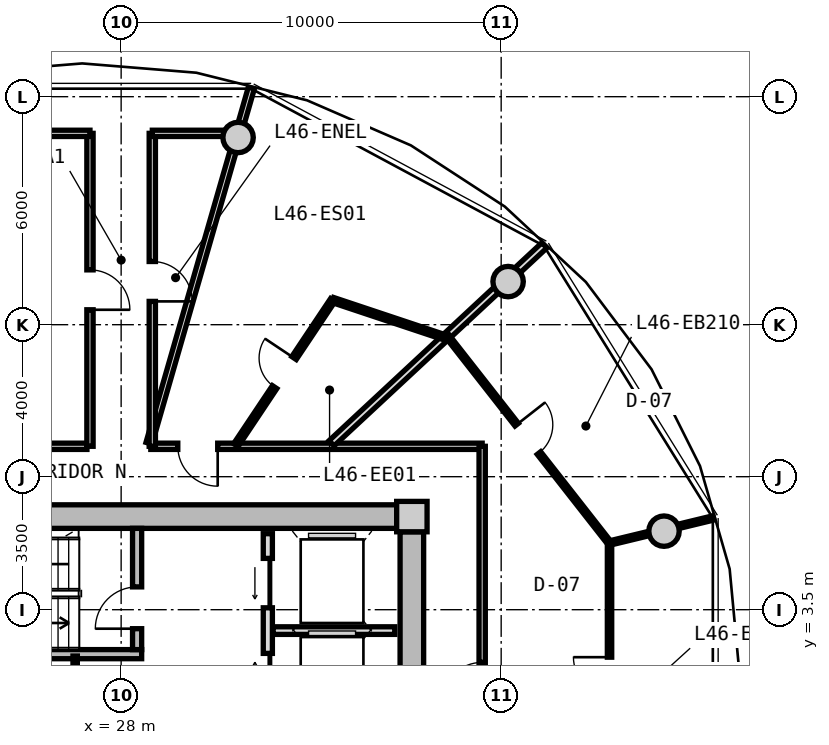
"""IFC4 building model, lengths in metres.
Left out: names, types, materials, properties, quantities, classifications, styles, units other than length and angle.
Written with IfcOpenShell. Run it as: python <this file> out.ifc"""

import sys

from ifc_helpers import new_model, si_unit, direction, frame, frame_2d, origin, origin_2d, place, context, subcontext, project, spatial, rectangle, circle, extrude, source, transform, mapped, element, fill, save


model = new_model("IFC4")
c1 = context("Model", 3, precision=1e-05, world=origin(), true_north=direction((0.0, 1.0)))
c2 = subcontext(c1, "Body", "Model", "MODEL_VIEW")
j1 = project(units=[si_unit("LENGTHUNIT", "METRE"), si_unit("PLANEANGLEUNIT", "RADIAN")], contexts=[c1])
p1 = place(None, origin())
s1 = spatial("IfcSite", under=j1, at=p1, CompositionType="ELEMENT")
p2 = place(p1, origin())
s2 = spatial("IfcBuilding", under=s1, at=p2, CompositionType="ELEMENT")
p3 = place(p2, frame((0.0, 0.0, 149.55)))
s3 = spatial("IfcBuildingStorey", under=s2, at=p3, CompositionType="ELEMENT", Elevation=149.55)
m1 = source(origin(), c2, "Body", "SweptSolid", [
    extrude(rectangle(XDim=0.8, YDim=0.8, at=origin_2d()), origin(), (0.0, 0.0, 1.0), 3.05),
])
p4 = place(p3, frame((35.65, 5.95, 0.0), z_axis=(0.0, 0.0, 1.0), x_axis=(1.0, 0.0, 0.0)))
e1 = element("IfcColumn", 1, at=p4, inside=s3, PredefinedType="COLUMN", context=c2, shape_type="MappedRepresentation", body=[
    mapped(m1, transform((0.0, 0.0, 0.0), x_axis=(1.0, 0.0, 0.0), y_axis=(0.0, 1.0, 0.0), z_axis=(0.0, 0.0, 1.0), scale=1.0)),
])
m2 = source(origin(), c2, "Body", "SweptSolid", [
    extrude(rectangle(XDim=14.5, YDim=0.62, at=frame_2d((7.25, 0.0))), origin(), (0.0, 0.0, 1.0), 2.81),
])
p5 = place(p3, frame((20.75, 5.95, 0.0), z_axis=(0.0, 0.0, 1.0), x_axis=(1.0, 0.0, 0.0)))
e2 = element("IfcWall", 2, at=p5, inside=s3, PredefinedType="SHEAR", context=c2, shape_type="MappedRepresentation", body=[
    mapped(m2, transform((0.0, 0.0, 0.0), x_axis=(1.0, 0.0, 0.0), y_axis=(0.0, 1.0, 0.0), z_axis=(0.0, 0.0, 1.0), scale=1.0)),
])
m3 = source(origin(), c2, "Body", "SweptSolid", [
    extrude(rectangle(XDim=11.1, YDim=0.62, at=frame_2d((5.55, 0.0))), origin(), (0.0, 0.0, 1.0), 2.81),
])
p6 = place(p3, frame((35.65, 5.55, 0.0), z_axis=(0.0, 0.0, 1.0), x_axis=(0.0, -1.0, 0.0)))
e3 = element("IfcWall", 3, at=p6, inside=s3, PredefinedType="SHEAR", context=c2, shape_type="MappedRepresentation", body=[
    mapped(m3, transform((0.0, 0.0, 0.0), x_axis=(1.0, 0.0, 0.0), y_axis=(0.0, 1.0, 0.0), z_axis=(0.0, 0.0, 1.0), scale=1.0)),
])
p7 = place(p6, frame((5.65, 0.0, 0.0)))
e4 = element("IfcOpeningElement", 4, at=p7, cuts=e3, PredefinedType="OPENING", context=c2, shape_type="SweptSolid", body=[
    extrude(rectangle(XDim=1.2, YDim=2.15, at=frame_2d((0.6, 1.075))), frame((0.0, 0.32, 0.0), z_axis=(0.0, -1.0, 0.0), x_axis=(1.0, 0.0, 0.0)), (0.0, 0.0, 1.0), 0.64),
])
p8 = place(p6, frame((9.3, 0.0, 0.0)))
e5 = element("IfcOpeningElement", 5, at=p8, cuts=e3, PredefinedType="OPENING", context=c2, shape_type="SweptSolid", body=[
    extrude(rectangle(XDim=1.0, YDim=2.1, at=frame_2d((0.5, 1.05))), frame((0.0, 0.32, 0.0), z_axis=(0.0, -1.0, 0.0), x_axis=(1.0, 0.0, 0.0)), (0.0, 0.0, 1.0), 0.64),
])
m4 = source(origin(), c2, "Body", "SweptSolid", [
    extrude(circle(Radius=0.4, at=origin_2d()), origin(), (0.0, 0.0, 1.0), 3.05),
])
for number, where, z_axis, x_axis in (
    (6, (42.285, 5.567, 0.0), (0.0, 0.0, 1.0), (1.0, 0.0, 0.0)),
    (7, (38.183, 12.135, 0.0), (0.0, 0.0, 1.0), (1.0, 0.0, 0.0)),
    (8, (31.077, 15.926, 0.0), (0.0, 0.0, 1.0), (1.0, 0.0, 0.0)),
):
    element("IfcColumn", number, at=place(p3, frame(where, z_axis=z_axis, x_axis=x_axis)), inside=s3, PredefinedType="COLUMN", context=c2, shape_type="MappedRepresentation", body=[
        mapped(m4, transform((0.0, 0.0, 0.0), x_axis=(1.0, 0.0, 0.0), y_axis=(0.0, 1.0, 0.0), z_axis=(0.0, 0.0, 1.0), scale=1.0)),
    ])
m5 = source(origin(), c2, "Body", "SweptSolid", [
    extrude(rectangle(XDim=7.88, YDim=0.24, at=frame_2d((3.94, 0.0))), origin(), (0.0, 0.0, 1.0), 2.81),
])
p9 = place(p3, frame((20.66, 2.33, 0.0), z_axis=(0.0, 0.0, 1.0), x_axis=(1.0, 0.0, 0.0)))
e9 = element("IfcWall", 9, at=p9, inside=s3, PredefinedType="PARTITIONING", context=c2, shape_type="MappedRepresentation", body=[
    mapped(m5, transform((0.0, 0.0, 0.0), x_axis=(1.0, 0.0, 0.0), y_axis=(0.0, 1.0, 0.0), z_axis=(0.0, 0.0, 1.0), scale=1.0)),
])
m6 = source(origin(), c2, "Body", "SweptSolid", [
    extrude(rectangle(XDim=3.19, YDim=0.24, at=frame_2d((1.595, 0.0))), origin(), (0.0, 0.0, 1.0), 2.81),
])
p10 = place(p3, frame((28.42, 2.45, 0.0), z_axis=(0.0, 0.0, 1.0), x_axis=(0.0, 1.0, 0.0)))
e10 = element("IfcWall", 10, at=p10, inside=s3, PredefinedType="PARTITIONING", context=c2, shape_type="MappedRepresentation", body=[
    mapped(m6, transform((0.0, 0.0, 0.0), x_axis=(1.0, 0.0, 0.0), y_axis=(0.0, 1.0, 0.0), z_axis=(0.0, 0.0, 1.0), scale=1.0)),
])
p11 = place(p10, frame((0.55, 0.0, 0.0)))
e11 = element("IfcOpeningElement", 11, at=p11, cuts=e10, PredefinedType="OPENING", context=c2, shape_type="SweptSolid", body=[
    extrude(rectangle(XDim=1.1, YDim=2.15, at=frame_2d((0.55, 1.075))), frame((0.0, 0.13, 0.0), z_axis=(0.0, -1.0, 0.0), x_axis=(1.0, 0.0, 0.0)), (0.0, 0.0, 1.0), 0.26),
])
m7 = source(origin(), c2, "Body", "SweptSolid", [
    extrude(rectangle(XDim=5.0, YDim=0.24, at=frame_2d((2.5, 0.0))), origin(), (0.0, 0.0, 1.0), 2.795),
])
p12 = place(p3, frame((31.86, 0.5, 0.0), z_axis=(0.0, 0.0, 1.0), x_axis=(0.0, 1.0, 0.0)))
e12 = element("IfcWall", 12, at=p12, inside=s3, PredefinedType="PARTITIONING", context=c2, shape_type="MappedRepresentation", body=[
    mapped(m7, transform((0.0, 0.0, 0.0), x_axis=(1.0, 0.0, 0.0), y_axis=(0.0, 1.0, 0.0), z_axis=(0.0, 0.0, 1.0), scale=1.0)),
])
p13 = place(p12, frame((3.05, 0.0, 0.0)))
e13 = element("IfcOpeningElement", 13, at=p13, cuts=e12, PredefinedType="OPENING", context=c2, shape_type="SweptSolid", body=[
    extrude(rectangle(XDim=1.3, YDim=2.2, at=frame_2d((0.65, 1.1))), frame((0.0, 0.13, 0.0), z_axis=(0.0, -1.0, 0.0), x_axis=(1.0, 0.0, 0.0)), (0.0, 0.0, 1.0), 0.26),
])
p14 = place(p12, frame((0.55, 0.0, 0.0)))
e14 = element("IfcOpeningElement", 14, at=p14, cuts=e12, PredefinedType="OPENING", context=c2, shape_type="SweptSolid", body=[
    extrude(rectangle(XDim=1.3, YDim=2.2, at=frame_2d((0.65, 1.1))), frame((0.0, 0.13, 0.0), z_axis=(0.0, -1.0, 0.0), x_axis=(1.0, 0.0, 0.0)), (0.0, 0.0, 1.0), 0.26),
])
m8 = source(origin(), c2, "Body", "SweptSolid", [
    extrude(rectangle(XDim=3.2, YDim=0.2, at=frame_2d((1.6, 0.0))), origin(), (0.0, 0.0, 1.0), 2.795),
])
p15 = place(p3, frame((32.0, 2.95, 0.0), z_axis=(0.0, 0.0, 1.0), x_axis=(1.0, 0.0, 0.0)))
e15 = element("IfcWall", 15, at=p15, inside=s3, PredefinedType="PARTITIONING", context=c2, shape_type="MappedRepresentation", body=[
    mapped(m8, transform((0.0, 0.0, 0.0), x_axis=(1.0, 0.0, 0.0), y_axis=(0.0, 1.0, 0.0), z_axis=(0.0, 0.0, 1.0), scale=1.0)),
])
m9 = source(origin(), c2, "Body", "SweptSolid", [
    extrude(rectangle(XDim=2.33, YDim=0.115, at=frame_2d((1.165, 0.0))), origin(), (0.0, 0.0, 1.0), 2.795),
])
p16 = place(p3, frame((26.79, -0.05, 0.0), z_axis=(0.0, 0.0, 1.0), x_axis=(0.0, 1.0, 0.0)))
e16 = element("IfcWall", 16, at=p16, inside=s3, PredefinedType="PARTITIONING", context=c2, shape_type="MappedRepresentation", body=[
    mapped(m9, transform((0.0, 0.0, 0.0), x_axis=(1.0, 0.0, 0.0), y_axis=(0.0, 1.0, 0.0), z_axis=(0.0, 0.0, 1.0), scale=1.0)),
])
m10 = source(origin(), c2, "Body", "SweptSolid", [
    extrude(rectangle(XDim=8.6, YDim=0.165, at=frame_2d((4.3, 0.0))), origin(), (0.0, 0.0, 1.0), 2.795),
])
p17 = place(p3, frame((18.5, 7.8, 0.0), z_axis=(0.0, 0.0, 1.0), x_axis=(1.0, 0.0, 0.0)))
e17 = element("IfcWall", 17, at=p17, inside=s3, PredefinedType="PARTITIONING", context=c2, shape_type="MappedRepresentation", body=[
    mapped(m10, transform((0.0, 0.0, 0.0), x_axis=(1.0, 0.0, 0.0), y_axis=(0.0, 1.0, 0.0), z_axis=(0.0, 0.0, 1.0), scale=1.0)),
])
m11 = source(origin(), c2, "Body", "SweptSolid", [
    extrude(rectangle(XDim=8.719, YDim=0.165, at=frame_2d((4.36, 0.0))), origin(), (0.0, 0.0, 1.0), 2.795),
])
p18 = place(p3, frame((28.781, 7.8, 0.0), z_axis=(0.0, 0.0, 1.0), x_axis=(1.0, 0.0, 0.0)))
e18 = element("IfcWall", 18, at=p18, inside=s3, PredefinedType="PARTITIONING", context=c2, shape_type="MappedRepresentation", body=[
    mapped(m11, transform((0.0, 0.0, 0.0), x_axis=(1.0, 0.0, 0.0), y_axis=(0.0, 1.0, 0.0), z_axis=(0.0, 0.0, 1.0), scale=1.0)),
])
p19 = place(p18, frame((0.71, 0.0, 0.0)))
e19 = element("IfcOpeningElement", 19, at=p19, cuts=e18, PredefinedType="OPENING", context=c2, shape_type="SweptSolid", body=[
    extrude(rectangle(XDim=1.05, YDim=2.15, at=frame_2d((0.525, 1.075))), frame((0.0, 0.093, 0.0), z_axis=(0.0, -1.0, 0.0), x_axis=(1.0, 0.0, 0.0)), (0.0, 0.0, 1.0), 0.185),
])
m12 = source(origin(), c2, "Body", "SweptSolid", [
    extrude(rectangle(XDim=15.6, YDim=0.165, at=frame_2d((7.8, 0.0))), origin(), (0.0, 0.0, 1.0), 2.795),
])
p20 = place(p3, frame((37.5, 7.8, 0.0), z_axis=(0.0, 0.0, 1.0), x_axis=(0.0, -1.0, 0.0)))
e20 = element("IfcWall", 20, at=p20, inside=s3, PredefinedType="PARTITIONING", context=c2, shape_type="MappedRepresentation", body=[
    mapped(m12, transform((0.0, 0.0, 0.0), x_axis=(1.0, 0.0, 0.0), y_axis=(0.0, 1.0, 0.0), z_axis=(0.0, 0.0, 1.0), scale=1.0)),
])
p21 = place(p20, frame((5.687, 0.0, 0.0)))
e21 = element("IfcOpeningElement", 21, at=p21, cuts=e20, PredefinedType="OPENING", context=c2, shape_type="SweptSolid", body=[
    extrude(rectangle(XDim=1.05, YDim=2.15, at=frame_2d((0.525, 1.075))), frame((0.0, 0.093, 0.0), z_axis=(0.0, -1.0, 0.0), x_axis=(1.0, 0.0, 0.0)), (0.0, 0.0, 1.0), 0.185),
])
m13 = source(origin(), c2, "Body", "SweptSolid", [
    extrude(rectangle(XDim=9.73, YDim=0.165, at=frame_2d((4.865, 0.0))), origin(), (0.0, 0.0, 1.0), 2.345),
])
p22 = place(p3, frame((28.733, 7.88, 0.0), z_axis=(0.0, 0.0, 1.0), x_axis=(0.27679492614, 0.960929013436, 0.0)))
e22 = element("IfcWall", 22, at=p22, inside=s3, PredefinedType="PARTITIONING", context=c2, shape_type="MappedRepresentation", body=[
    mapped(m13, transform((0.0, 0.0, 0.0), x_axis=(1.0, 0.0, 0.0), y_axis=(0.0, 1.0, 0.0), z_axis=(0.0, 0.0, 1.0), scale=1.0)),
])
m14 = source(origin(), c2, "Body", "SweptSolid", [
    extrude(rectangle(XDim=8.235, YDim=0.165, at=frame_2d((4.118, 0.0))), origin(), (0.0, 0.0, 1.0), 2.795),
])
p23 = place(p3, frame((27.18, 7.8, 0.0), z_axis=(0.0, 0.0, 1.0), x_axis=(0.0, 1.0, 0.0)))
e23 = element("IfcWall", 23, at=p23, inside=s3, PredefinedType="PARTITIONING", context=c2, shape_type="MappedRepresentation", body=[
    mapped(m14, transform((0.0, 0.0, 0.0), x_axis=(1.0, 0.0, 0.0), y_axis=(0.0, 1.0, 0.0), z_axis=(0.0, 0.0, 1.0), scale=1.0)),
])
p24 = place(p23, frame((3.593, 0.0, 0.0)))
e24 = element("IfcOpeningElement", 24, at=p24, cuts=e23, PredefinedType="OPENING", context=c2, shape_type="SweptSolid", body=[
    extrude(rectangle(XDim=1.05, YDim=2.15, at=frame_2d((0.525, 1.075))), frame((0.0, 0.093, 0.0), z_axis=(0.0, -1.0, 0.0), x_axis=(1.0, 0.0, 0.0)), (0.0, 0.0, 1.0), 0.185),
])
m15 = source(origin(), c2, "Body", "SweptSolid", [
    extrude(rectangle(XDim=7.139, YDim=0.165, at=frame_2d((3.569, 0.0))), origin(), (0.0, 0.0, 1.0), 2.345),
])
p25 = place(p3, frame((20.041, 16.035, 0.0), z_axis=(0.0, 0.0, 1.0), x_axis=(1.0, 0.0, 0.0)))
e25 = element("IfcWall", 25, at=p25, inside=s3, PredefinedType="PARTITIONING", context=c2, shape_type="MappedRepresentation", body=[
    mapped(m15, transform((0.0, 0.0, 0.0), x_axis=(1.0, 0.0, 0.0), y_axis=(0.0, 1.0, 0.0), z_axis=(0.0, 0.0, 1.0), scale=1.0)),
])
p26 = place(p3, frame((28.82, 7.8, 0.0), z_axis=(0.0, 0.0, 1.0), x_axis=(0.0, 1.0, 0.0)))
e26 = element("IfcWall", 26, at=p26, inside=s3, PredefinedType="PARTITIONING", context=c2, shape_type="MappedRepresentation", body=[
    mapped(m14, transform((0.0, 0.0, 0.0), x_axis=(1.0, 0.0, 0.0), y_axis=(0.0, 1.0, 0.0), z_axis=(0.0, 0.0, 1.0), scale=1.0)),
])
p27 = place(p26, frame((3.813, 0.0, 0.0)))
e27 = element("IfcOpeningElement", 27, at=p27, cuts=e26, PredefinedType="OPENING", context=c2, shape_type="SweptSolid", body=[
    extrude(rectangle(XDim=1.05, YDim=2.15, at=frame_2d((0.525, 1.075))), frame((0.0, 0.093, 0.0), z_axis=(0.0, -1.0, 0.0), x_axis=(1.0, 0.0, 0.0)), (0.0, 0.0, 1.0), 0.185),
])
m16 = source(origin(), c2, "Body", "SweptSolid", [
    extrude(rectangle(XDim=2.419, YDim=0.165, at=frame_2d((1.209, 0.0))), origin(), (0.0, 0.0, 1.0), 2.345),
])
p28 = place(p3, frame((28.82, 16.035, 0.0), z_axis=(0.0, 0.0, 1.0), x_axis=(1.0, 0.0, 0.0)))
e28 = element("IfcWall", 28, at=p28, inside=s3, PredefinedType="PARTITIONING", context=c2, shape_type="MappedRepresentation", body=[
    mapped(m16, transform((0.0, 0.0, 0.0), x_axis=(1.0, 0.0, 0.0), y_axis=(0.0, 1.0, 0.0), z_axis=(0.0, 0.0, 1.0), scale=1.0)),
])
m17 = source(origin(), c2, "Body", "SweptSolid", [
    extrude(rectangle(XDim=7.648, YDim=0.19, at=frame_2d((3.824, 0.0))), origin(), (0.0, 0.0, 1.0), 2.345),
])
p29 = place(p3, frame((33.538, 7.88, 0.0), z_axis=(0.0, 0.0, 1.0), x_axis=(0.732167856666, 0.681124239522, 0.0)))
e29 = element("IfcWall", 29, at=p29, inside=s3, PredefinedType="PARTITIONING", context=c2, shape_type="MappedRepresentation", body=[
    mapped(m17, transform((0.0, 0.0, 0.0), x_axis=(1.0, 0.0, 0.0), y_axis=(0.0, 1.0, 0.0), z_axis=(0.0, 0.0, 1.0), scale=1.0)),
])
m18 = source(origin(), c2, "Body", "SweptSolid", [
    extrude(rectangle(XDim=6.958, YDim=0.115, at=frame_2d((3.479, 0.0))), origin(), (0.0, 0.0, 1.0), 2.795),
])
p30 = place(p3, frame((40.851, -1.703, 0.0), z_axis=(0.0, 0.0, 1.0), x_axis=(0.0, 1.0, 0.0)))
e30 = element("IfcWall", 30, at=p30, inside=s3, PredefinedType="PARTITIONING", context=c2, shape_type="MappedRepresentation", body=[
    mapped(m18, transform((0.0, 0.0, 0.0), x_axis=(1.0, 0.0, 0.0), y_axis=(0.0, 1.0, 0.0), z_axis=(0.0, 0.0, 1.0), scale=1.0)),
])
p31 = place(p30, frame((3.004, 0.0, 0.0)))
e31 = element("IfcOpeningElement", 31, at=p31, cuts=e30, PredefinedType="OPENING", context=c2, shape_type="SweptSolid", body=[
    extrude(rectangle(XDim=0.95, YDim=2.1, at=frame_2d((0.475, 1.05))), frame((0.0, 0.067, 0.0), z_axis=(0.0, -1.0, 0.0), x_axis=(1.0, 0.0, 0.0)), (0.0, 0.0, 1.0), 0.135),
])
m19 = source(origin(), c2, "Body", "SweptSolid", [
    extrude(rectangle(XDim=6.966, YDim=0.115, at=frame_2d((3.483, 0.0))), origin(), (0.0, 0.0, 1.0), 2.795),
])
p32 = place(p3, frame((40.85, 5.254, 0.0), z_axis=(0.0, 0.0, 1.0), x_axis=(-0.616695640563, 0.787201681217, 0.0)))
e32 = element("IfcWall", 32, at=p32, inside=s3, PredefinedType="PARTITIONING", context=c2, shape_type="MappedRepresentation", body=[
    mapped(m19, transform((0.0, 0.0, 0.0), x_axis=(1.0, 0.0, 0.0), y_axis=(0.0, 1.0, 0.0), z_axis=(0.0, 0.0, 1.0), scale=1.0)),
])
p33 = place(p32, frame((3.008, 0.0, 0.0)))
e33 = element("IfcOpeningElement", 33, at=p33, cuts=e32, PredefinedType="OPENING", context=c2, shape_type="SweptSolid", body=[
    extrude(rectangle(XDim=0.95, YDim=2.1, at=frame_2d((0.475, 1.05))), frame((0.0, 0.067, 0.0), z_axis=(0.0, -1.0, 0.0), x_axis=(1.0, 0.0, 0.0)), (0.0, 0.0, 1.0), 0.135),
])
m20 = source(origin(), c2, "Body", "SweptSolid", [
    extrude(rectangle(XDim=2.818, YDim=0.115, at=frame_2d((1.409, 0.0))), origin(), (0.0, 0.0, 1.0), 2.345),
])
p34 = place(p3, frame((40.85, 5.254, 0.0), z_axis=(0.0, 0.0, 1.0), x_axis=(0.971949193017, 0.235190914353, 0.0)))
e34 = element("IfcWall", 34, at=p34, inside=s3, PredefinedType="PARTITIONING", context=c2, shape_type="MappedRepresentation", body=[
    mapped(m20, transform((0.0, 0.0, 0.0), x_axis=(1.0, 0.0, 0.0), y_axis=(0.0, 1.0, 0.0), z_axis=(0.0, 0.0, 1.0), scale=1.0)),
])
m21 = source(origin(), c2, "Body", "SweptSolid", [
    extrude(rectangle(XDim=4.593, YDim=0.14, at=frame_2d((2.296, 0.0))), origin(), (0.0, 0.0, 1.0), 2.795),
])
p35 = place(p3, frame((31.019, 7.83, 0.0), z_axis=(0.0, 0.0, 1.0), x_axis=(0.555362412301, 0.831608436107, 0.0)))
e35 = element("IfcWall", 35, at=p35, inside=s3, PredefinedType="PARTITIONING", context=c2, shape_type="MappedRepresentation", body=[
    mapped(m21, transform((0.0, 0.0, 0.0), x_axis=(1.0, 0.0, 0.0), y_axis=(0.0, 1.0, 0.0), z_axis=(0.0, 0.0, 1.0), scale=1.0)),
])
p36 = place(p35, frame((1.836, 0.0, 0.0)))
e36 = element("IfcOpeningElement", 36, at=p36, cuts=e35, PredefinedType="OPENING", context=c2, shape_type="SweptSolid", body=[
    extrude(rectangle(XDim=0.92, YDim=2.1, at=frame_2d((0.46, 1.05))), frame((0.0, 0.08, 0.0), z_axis=(0.0, -1.0, 0.0), x_axis=(1.0, 0.0, 0.0)), (0.0, 0.0, 1.0), 0.16),
])
m22 = source(origin(), c2, "Body", "SweptSolid", [
    extrude(rectangle(XDim=3.077, YDim=0.14, at=frame_2d((1.538, 0.0))), origin(), (0.0, 0.0, 1.0), 2.795),
])
p37 = place(p3, frame((33.57, 11.65, 0.0), z_axis=(0.0, 0.0, 1.0), x_axis=(0.948635676976, -0.3163705934, 0.0)))
e37 = element("IfcWall", 37, at=p37, inside=s3, PredefinedType="PARTITIONING", context=c2, shape_type="MappedRepresentation", body=[
    mapped(m22, transform((0.0, 0.0, 0.0), x_axis=(1.0, 0.0, 0.0), y_axis=(0.0, 1.0, 0.0), z_axis=(0.0, 0.0, 1.0), scale=1.0)),
])
m23 = source(origin(), c2, "Body", "SweptSolid", [
    extrude(rectangle(XDim=1.1, YDim=2.15, at=frame_2d((0.55, 1.075))), frame((0.0, 0.025, 0.0), z_axis=(0.0, -1.0, 0.0), x_axis=(1.0, 0.0, 0.0)), (0.0, 0.0, 1.0), 0.05),
])
p38 = place(p11, origin())
e38 = element("IfcDoor", 38, at=p38, inside=s3, OperationType="SINGLE_SWING_LEFT", PredefinedType="DOOR", context=c2, shape_type="MappedRepresentation", body=[
    mapped(m23, transform((0.0, 0.0, 0.0), x_axis=(1.0, 0.0, 0.0), y_axis=(0.0, 1.0, 0.0), z_axis=(0.0, 0.0, 1.0), scale=1.0)),
])
fill(e11, e38)
m24 = source(origin(), c2, "Body", "SweptSolid", [
    extrude(rectangle(XDim=1.3, YDim=2.2, at=frame_2d((0.65, 1.1))), frame((0.0, 0.025, 0.0), z_axis=(0.0, -1.0, 0.0), x_axis=(1.0, 0.0, 0.0)), (0.0, 0.0, 1.0), 0.05),
])
p39 = place(p13, origin())
e39 = element("IfcDoor", 39, at=p39, inside=s3, OperationType="SLIDING_TO_LEFT", PredefinedType="DOOR", context=c2, shape_type="MappedRepresentation", body=[
    mapped(m24, transform((0.0, 0.0, 0.0), x_axis=(1.0, 0.0, 0.0), y_axis=(0.0, 1.0, 0.0), z_axis=(0.0, 0.0, 1.0), scale=1.0)),
])
fill(e13, e39)
p40 = place(p14, origin())
e40 = element("IfcDoor", 40, at=p40, inside=s3, OperationType="SLIDING_TO_RIGHT", PredefinedType="DOOR", context=c2, shape_type="MappedRepresentation", body=[
    mapped(m24, transform((0.0, 0.0, 0.0), x_axis=(1.0, 0.0, 0.0), y_axis=(0.0, 1.0, 0.0), z_axis=(0.0, 0.0, 1.0), scale=1.0)),
])
fill(e14, e40)
m25 = source(origin(), c2, "Body", "SweptSolid", [
    extrude(rectangle(XDim=1.05, YDim=2.15, at=frame_2d((0.525, 1.075))), frame((0.0, 0.025, 0.0), z_axis=(0.0, -1.0, 0.0), x_axis=(1.0, 0.0, 0.0)), (0.0, 0.0, 1.0), 0.05),
])
p41 = place(p24, frame((1.05, 0.0, 0.0), z_axis=(0.0, 0.0, 1.0), x_axis=(-1.0, 0.0, 0.0)))
e41 = element("IfcDoor", 41, at=p41, inside=s3, OperationType="SINGLE_SWING_RIGHT", PredefinedType="DOOR", context=c2, shape_type="MappedRepresentation", body=[
    mapped(m25, transform((0.0, 0.0, 0.0), x_axis=(1.0, 0.0, 0.0), y_axis=(0.0, 1.0, 0.0), z_axis=(0.0, 0.0, 1.0), scale=1.0)),
])
fill(e24, e41)
p42 = place(p27, frame((1.05, 0.0, 0.0), z_axis=(0.0, 0.0, 1.0), x_axis=(-1.0, 0.0, 0.0)))
e42 = element("IfcDoor", 42, at=p42, inside=s3, OperationType="SINGLE_SWING_RIGHT", PredefinedType="DOOR", context=c2, shape_type="MappedRepresentation", body=[
    mapped(m25, transform((0.0, 0.0, 0.0), x_axis=(1.0, 0.0, 0.0), y_axis=(0.0, 1.0, 0.0), z_axis=(0.0, 0.0, 1.0), scale=1.0)),
])
fill(e27, e42)
p43 = place(p21, frame((1.05, 0.0, 0.0), z_axis=(0.0, 0.0, 1.0), x_axis=(-1.0, 0.0, 0.0)))
e43 = element("IfcDoor", 43, at=p43, inside=s3, OperationType="SINGLE_SWING_LEFT", PredefinedType="DOOR", context=c2, shape_type="MappedRepresentation", body=[
    mapped(m25, transform((0.0, 0.0, 0.0), x_axis=(1.0, 0.0, 0.0), y_axis=(0.0, 1.0, 0.0), z_axis=(0.0, 0.0, 1.0), scale=1.0)),
])
fill(e21, e43)
m26 = source(origin(), c2, "Body", "SweptSolid", [
    extrude(rectangle(XDim=0.95, YDim=2.1, at=frame_2d((0.475, 1.05))), frame((0.0, 0.025, 0.0), z_axis=(0.0, -1.0, 0.0), x_axis=(1.0, 0.0, 0.0)), (0.0, 0.0, 1.0), 0.05),
])
p44 = place(p31, origin())
e44 = element("IfcDoor", 44, at=p44, inside=s3, OperationType="SINGLE_SWING_RIGHT", PredefinedType="DOOR", context=c2, shape_type="MappedRepresentation", body=[
    mapped(m26, transform((0.0, 0.0, 0.0), x_axis=(1.0, 0.0, 0.0), y_axis=(0.0, 1.0, 0.0), z_axis=(0.0, 0.0, 1.0), scale=1.0)),
])
fill(e31, e44)
p45 = place(p33, frame((0.95, 0.0, 0.0), z_axis=(0.0, 0.0, 1.0), x_axis=(-1.0, 0.0, 0.0)))
e45 = element("IfcDoor", 45, at=p45, inside=s3, OperationType="SINGLE_SWING_LEFT", PredefinedType="DOOR", context=c2, shape_type="MappedRepresentation", body=[
    mapped(m26, transform((0.0, 0.0, 0.0), x_axis=(1.0, 0.0, 0.0), y_axis=(0.0, 1.0, 0.0), z_axis=(0.0, 0.0, 1.0), scale=1.0)),
])
fill(e33, e45)
p46 = place(p19, frame((1.05, 0.0, 0.0), z_axis=(0.0, 0.0, 1.0), x_axis=(-1.0, 0.0, 0.0)))
e46 = element("IfcDoor", 46, at=p46, inside=s3, OperationType="SINGLE_SWING_LEFT", PredefinedType="DOOR", context=c2, shape_type="MappedRepresentation", body=[
    mapped(m25, transform((0.0, 0.0, 0.0), x_axis=(1.0, 0.0, 0.0), y_axis=(0.0, 1.0, 0.0), z_axis=(0.0, 0.0, 1.0), scale=1.0)),
])
fill(e19, e46)
m27 = source(origin(), c2, "Body", "SweptSolid", [
    extrude(rectangle(XDim=0.92, YDim=2.1, at=frame_2d((0.46, 1.05))), frame((0.0, 0.025, 0.0), z_axis=(0.0, -1.0, 0.0), x_axis=(1.0, 0.0, 0.0)), (0.0, 0.0, 1.0), 0.05),
])
p47 = place(p36, origin())
e47 = element("IfcDoor", 47, at=p47, inside=s3, OperationType="SINGLE_SWING_RIGHT", PredefinedType="DOOR", context=c2, shape_type="MappedRepresentation", body=[
    mapped(m27, transform((0.0, 0.0, 0.0), x_axis=(1.0, 0.0, 0.0), y_axis=(0.0, 1.0, 0.0), z_axis=(0.0, 0.0, 1.0), scale=1.0)),
])
fill(e36, e47)
save(model, sys.argv[1])
